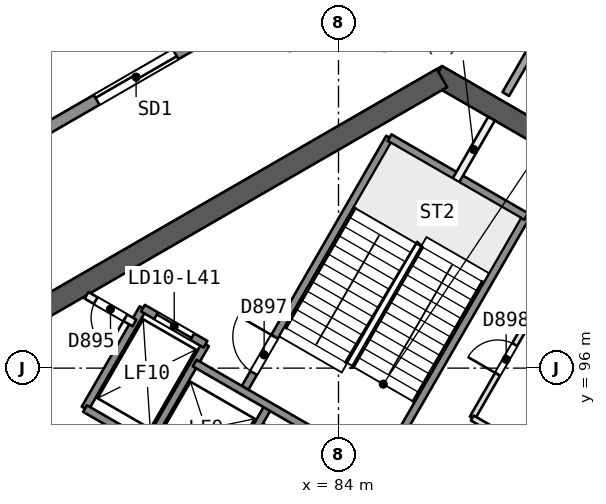
"""IFC4 building model, lengths in metres.
Left out: names, types, materials, properties, quantities, classifications, styles, units other than length and angle.
Written with IfcOpenShell. Run it as: python <this file> out.ifc"""

import sys

from ifc_helpers import new_model, si_unit, direction, frame, frame_2d, origin, place, context, subcontext, project, spatial, rectangle, extrude, element, fill, save


model = new_model("IFC4")
c1 = context("Model", 3, precision=1e-05, world=origin(), true_north=direction((0.0, 1.0)))
c2 = subcontext(c1, "Body", "Model", "MODEL_VIEW")
j1 = project(units=[si_unit("LENGTHUNIT", "METRE"), si_unit("PLANEANGLEUNIT", "RADIAN")], contexts=[c1])
p1 = place(None, origin())
s1 = spatial("IfcSite", under=j1, at=p1, CompositionType="ELEMENT")
p2 = place(p1, origin())
s2 = spatial("IfcBuilding", under=s1, at=p2, CompositionType="ELEMENT")
p3 = place(p2, frame((0.0, 0.0, 171.1)))
s3 = spatial("IfcBuildingStorey", under=s2, at=p3, CompositionType="ELEMENT", Elevation=171.1)
p4 = place(p3, frame((89.605, 101.969, 0.0), z_axis=(0.0, 0.0, 1.0), x_axis=(-0.865997833373, 0.500047750313, 0.0)))
e1 = element("IfcWall", 1, at=p4, inside=s3, PredefinedType="SHEAR", context=c2, shape_type="SweptSolid", body=[
    extrude(rectangle(XDim=3.487, YDim=0.55, at=frame_2d((1.743, 0.0))), origin(), (0.0, 0.0, 1.0), 3.7),
])
p5 = place(p3, frame((86.723, 103.633, 0.0), z_axis=(0.0, 0.0, 1.0), x_axis=(-0.866023530946, -0.500003243837, 0.0)))
e2 = element("IfcWall", 2, at=p5, inside=s3, PredefinedType="SHEAR", context=c2, shape_type="SweptSolid", body=[
    extrude(rectangle(XDim=14.175, YDim=0.55, at=frame_2d((7.087, 0.0))), origin(), (0.0, 0.0, 1.0), 3.7),
])
p6 = place(p3, frame((74.686, 96.683, 0.0), z_axis=(0.0, 0.0, 1.0), x_axis=(0.499997818338, -0.866026663364, 0.0)))
e3 = element("IfcWall", 3, at=p6, inside=s3, PredefinedType="SHEAR", context=c2, shape_type="SweptSolid", body=[
    extrude(rectangle(XDim=10.105, YDim=0.55, at=frame_2d((5.052, 0.0))), origin(), (0.0, 0.0, 1.0), 3.7),
])
p7 = place(p6, frame((7.955, 0.0, 0.0)))
e4 = element("IfcOpeningElement", 4, at=p7, cuts=e3, PredefinedType="OPENING", context=c2, shape_type="SweptSolid", body=[
    extrude(rectangle(XDim=1.2, YDim=2.1, at=frame_2d((0.6, 1.05))), frame((0.0, 0.286, 0.0), z_axis=(0.0, -1.0, 0.0), x_axis=(1.0, 0.0, 0.0)), (0.0, 0.0, 1.0), 0.571),
])
p8 = place(p3, frame((91.202, 108.06, 0.0), z_axis=(0.0, 0.0, 1.0), x_axis=(-0.500021875362, -0.86601277367, 0.0)))
e5 = element("IfcWall", 5, at=p8, inside=s3, PredefinedType="PARTITIONING", context=c2, shape_type="SweptSolid", body=[
    extrude(rectangle(XDim=5.599, YDim=0.2, at=frame_2d((2.8, 0.0))), origin(), (0.0, 0.0, 1.0), 3.25),
])
p9 = place(p3, frame((42.45, 82.744, 0.0), z_axis=(0.0, 0.0, 1.0), x_axis=(0.866024128163, 0.500002209434, 0.0)))
e6 = element("IfcWall", 6, at=p9, inside=s3, PredefinedType="SOLIDWALL", context=c2, shape_type="SweptSolid", body=[
    extrude(rectangle(XDim=53.635, YDim=0.3, at=frame_2d((26.817, 0.0))), origin(), (0.0, 0.0, 1.0), 3.25),
])
p10 = place(p9, frame((20.473, 0.0, 0.0)))
e7 = element("IfcOpeningElement", 7, at=p10, cuts=e6, PredefinedType="OPENING", context=c2, shape_type="SweptSolid", body=[
    extrude(rectangle(XDim=2.4, YDim=2.4, at=frame_2d((1.2, 1.2))), frame((0.0, 0.161, 0.0), z_axis=(0.0, -1.0, 0.0), x_axis=(1.0, 0.0, 0.0)), (0.0, 0.0, 1.0), 0.321),
])
p11 = place(p9, frame((9.514, 0.0, 0.0)))
e8 = element("IfcOpeningElement", 8, at=p11, cuts=e6, PredefinedType="OPENING", context=c2, shape_type="SweptSolid", body=[
    extrude(rectangle(XDim=2.4, YDim=2.4, at=frame_2d((1.2, 1.2))), frame((0.0, 0.161, 0.0), z_axis=(0.0, -1.0, 0.0), x_axis=(1.0, 0.0, 0.0)), (0.0, 0.0, 1.0), 0.321),
])
p12 = place(p9, frame((40.628, 0.0, 0.0)))
e9 = element("IfcOpeningElement", 9, at=p12, cuts=e6, PredefinedType="OPENING", context=c2, shape_type="SweptSolid", body=[
    extrude(rectangle(XDim=2.4, YDim=2.4, at=frame_2d((1.2, 1.2))), frame((0.0, 0.161, 0.0), z_axis=(0.0, -1.0, 0.0), x_axis=(1.0, 0.0, 0.0)), (0.0, 0.0, 1.0), 0.321),
])
p13 = place(p9, frame((27.632, 0.0, 0.9)))
e10 = element("IfcOpeningElement", 10, at=p13, cuts=e6, PredefinedType="OPENING", context=c2, shape_type="SweptSolid", body=[
    extrude(rectangle(XDim=1.8, YDim=1.5, at=frame_2d((0.9, 0.75))), frame((0.0, 0.161, 0.0), z_axis=(0.0, -1.0, 0.0), x_axis=(1.0, 0.0, 0.0)), (0.0, 0.0, 1.0), 0.321),
])
p14 = place(p9, frame((24.826, 0.0, 0.9)))
e11 = element("IfcOpeningElement", 11, at=p14, cuts=e6, PredefinedType="OPENING", context=c2, shape_type="SweptSolid", body=[
    extrude(rectangle(XDim=1.8, YDim=1.5, at=frame_2d((0.9, 0.75))), frame((0.0, 0.161, 0.0), z_axis=(0.0, -1.0, 0.0), x_axis=(1.0, 0.0, 0.0)), (0.0, 0.0, 1.0), 0.321),
])
p15 = place(p3, frame((87.521, 94.687, 0.0), z_axis=(0.0, 0.0, 1.0), x_axis=(0.500043727655, 0.866000156139, 0.0)))
e12 = element("IfcWall", 12, at=p15, inside=s3, PredefinedType="PARTITIONING", context=c2, shape_type="SweptSolid", body=[
    extrude(rectangle(XDim=3.618, YDim=0.15, at=frame_2d((1.809, 0.0))), origin(), (0.0, 0.0, 1.0), 3.25),
])
p16 = place(p15, frame((1.332, 0.0, 0.0)))
e13 = element("IfcOpeningElement", 13, at=p16, cuts=e12, PredefinedType="OPENING", context=c2, shape_type="SweptSolid", body=[
    extrude(rectangle(XDim=0.9, YDim=2.1, at=frame_2d((0.45, 1.05))), frame((0.0, 0.085, 0.0), z_axis=(0.0, -1.0, 0.0), x_axis=(1.0, 0.0, 0.0)), (0.0, 0.0, 1.0), 0.171),
])
p17 = place(p3, frame((85.087, 93.321, 0.0), z_axis=(0.0, 0.0, 1.0), x_axis=(0.500019787375, 0.866013979237, 0.0)))
e14 = element("IfcWall", 14, at=p17, inside=s3, PredefinedType="SOLIDWALL", context=c2, shape_type="SweptSolid", body=[
    extrude(rectangle(XDim=7.7, YDim=0.2, at=frame_2d((3.85, 0.0))), origin(), (0.0, 0.0, 1.0), 3.25),
])
p18 = place(p3, frame((87.09, 100.94, 0.0), z_axis=(0.0, 0.0, 1.0), x_axis=(0.499951854219, 0.86605319898, 0.0)))
e15 = element("IfcWall", 15, at=p18, inside=s3, PredefinedType="PARTITIONING", context=c2, shape_type="SweptSolid", body=[
    extrude(rectangle(XDim=1.873, YDim=0.2, at=frame_2d((0.937, 0.0))), origin(), (0.0, 0.0, 1.0), 3.25),
])
p19 = place(p3, frame((80.924, 92.861, 0.0), z_axis=(0.0, 0.0, 1.0), x_axis=(0.499961042966, 0.86604789447, 0.0)))
e16 = element("IfcWall", 16, at=p19, inside=s3, PredefinedType="SOLIDWALL", context=c2, shape_type="SweptSolid", body=[
    extrude(rectangle(XDim=2.48, YDim=0.2, at=frame_2d((1.24, 0.0))), origin(), (0.0, 0.0, 1.0), 3.25),
])
p20 = place(p3, frame((81.493, 95.396, 0.0), z_axis=(0.0, 0.0, 1.0), x_axis=(0.500006057782, 0.866021906294, 0.0)))
e17 = element("IfcWall", 17, at=p20, inside=s3, PredefinedType="SOLIDWALL", context=c2, shape_type="SweptSolid", body=[
    extrude(rectangle(XDim=7.7, YDim=0.2, at=frame_2d((3.85, 0.0))), origin(), (0.0, 0.0, 1.0), 3.25),
])
p21 = place(p20, frame((0.55, 0.0, 0.0)))
e18 = element("IfcOpeningElement", 18, at=p21, cuts=e17, PredefinedType="OPENING", context=c2, shape_type="SweptSolid", body=[
    extrude(rectangle(XDim=1.1, YDim=2.1, at=frame_2d((0.55, 1.05))), frame((0.0, 0.11, 0.0), z_axis=(0.0, -1.0, 0.0), x_axis=(1.0, 0.0, 0.0)), (0.0, 0.0, 1.0), 0.221),
])
for number, where, z_axis, x_axis in (
    (19, (78.976, 93.986, 0.0), (0.0, 0.0, 1.0), (0.5, 0.866, 0.0)),
    (20, (77.33, 94.936, 0.0), (0.0, 0.0, 1.0), (0.5, 0.866, 0.0)),
):
    element("IfcWall", number, at=place(p3, frame(where, z_axis=z_axis, x_axis=x_axis)), inside=s3, PredefinedType="SOLIDWALL", context=c2, shape_type="SweptSolid", body=[
        extrude(rectangle(XDim=3.05, YDim=0.2, at=frame_2d((1.525, 0.0))), origin(), (0.0, 0.0, 1.0), 3.25),
    ])
p22 = place(p3, frame((86.77, 89.486, 0.0), z_axis=(0.0, 0.0, 1.0), x_axis=(-0.86601811187, 0.500012629753, 0.0)))
e21 = element("IfcWall", 21, at=p22, inside=s3, PredefinedType="SOLIDWALL", context=c2, shape_type="SweptSolid", body=[
    extrude(rectangle(XDim=10.9, YDim=0.2, at=frame_2d((5.45, 0.0))), origin(), (0.0, 0.0, 1.0), 3.25),
])
p23 = place(p22, frame((0.575, 0.0, 0.0)))
e22 = element("IfcOpeningElement", 22, at=p23, cuts=e21, PredefinedType="OPENING", context=c2, shape_type="SweptSolid", body=[
    extrude(rectangle(XDim=1.1, YDim=2.1, at=frame_2d((0.55, 1.05))), frame((0.0, 0.11, 0.0), z_axis=(0.0, -1.0, 0.0), x_axis=(1.0, 0.0, 0.0)), (0.0, 0.0, 1.0), 0.221),
])
p24 = place(p22, frame((2.825, 0.0, 0.0)))
e23 = element("IfcOpeningElement", 23, at=p24, cuts=e21, PredefinedType="OPENING", context=c2, shape_type="SweptSolid", body=[
    extrude(rectangle(XDim=1.1, YDim=2.1, at=frame_2d((0.55, 1.05))), frame((0.0, 0.11, 0.0), z_axis=(0.0, -1.0, 0.0), x_axis=(1.0, 0.0, 0.0)), (0.0, 0.0, 1.0), 0.221),
])
p25 = place(p22, frame((5.075, 0.0, 0.0)))
e24 = element("IfcOpeningElement", 24, at=p25, cuts=e21, PredefinedType="OPENING", context=c2, shape_type="SweptSolid", body=[
    extrude(rectangle(XDim=1.1, YDim=2.1, at=frame_2d((0.55, 1.05))), frame((0.0, 0.11, 0.0), z_axis=(0.0, -1.0, 0.0), x_axis=(1.0, 0.0, 0.0)), (0.0, 0.0, 1.0), 0.221),
])
p26 = place(p22, frame((7.325, 0.0, 0.0)))
e25 = element("IfcOpeningElement", 25, at=p26, cuts=e21, PredefinedType="OPENING", context=c2, shape_type="SweptSolid", body=[
    extrude(rectangle(XDim=1.1, YDim=2.1, at=frame_2d((0.55, 1.05))), frame((0.0, 0.11, 0.0), z_axis=(0.0, -1.0, 0.0), x_axis=(1.0, 0.0, 0.0)), (0.0, 0.0, 1.0), 0.221),
])
p27 = place(p3, frame((89.33, 90.872, 0.0), z_axis=(0.0, 0.0, 1.0), x_axis=(-0.866027589512, 0.49999621419, 0.0)))
e26 = element("IfcWall", 26, at=p27, inside=s3, PredefinedType="SOLIDWALL", context=c2, shape_type="SweptSolid", body=[
    extrude(rectangle(XDim=10.524, YDim=0.2, at=frame_2d((5.262, 0.0))), origin(), (0.0, 0.0, 1.0), 3.25),
])
p28 = place(p27, frame((0.312, 0.0, 0.0)))
e27 = element("IfcOpeningElement", 27, at=p28, cuts=e26, PredefinedType="OPENING", context=c2, shape_type="SweptSolid", body=[
    extrude(rectangle(XDim=0.9, YDim=2.1, at=frame_2d((0.45, 1.05))), frame((0.0, 0.11, 0.0), z_axis=(0.0, -1.0, 0.0), x_axis=(1.0, 0.0, 0.0)), (0.0, 0.0, 1.0), 0.221),
])
p29 = place(p3, frame((78.63, 97.188, 0.0), z_axis=(0.0, 0.0, 1.0), x_axis=(-0.866003949776, 0.500037157592, 0.0)))
e28 = element("IfcWall", 28, at=p29, inside=s3, PredefinedType="PARTITIONING", context=c2, shape_type="SweptSolid", body=[
    extrude(rectangle(XDim=1.455, YDim=0.2, at=frame_2d((0.728, 0.0))), origin(), (0.0, 0.0, 1.0), 3.25),
])
p30 = place(p29, frame((0.278, 0.0, 0.0)))
e29 = element("IfcOpeningElement", 29, at=p30, cuts=e28, PredefinedType="OPENING", context=c2, shape_type="SweptSolid", body=[
    extrude(rectangle(XDim=0.9, YDim=2.1, at=frame_2d((0.45, 1.05))), frame((0.0, 0.11, 0.0), z_axis=(0.0, -1.0, 0.0), x_axis=(1.0, 0.0, 0.0)), (0.0, 0.0, 1.0), 0.221),
])
p31 = place(p3, frame((80.5, 96.627, 0.0), z_axis=(0.0, 0.0, 1.0), x_axis=(-0.86601224135, 0.500022797313, 0.0)))
e30 = element("IfcWall", 30, at=p31, inside=s3, PredefinedType="SOLIDWALL", context=c2, shape_type="SweptSolid", body=[
    extrude(rectangle(XDim=1.9, YDim=0.2, at=frame_2d((0.95, 0.0))), origin(), (0.0, 0.0, 1.0), 3.25),
])
p32 = place(p31, frame((0.4, 0.0, 0.0)))
e31 = element("IfcOpeningElement", 31, at=p32, cuts=e30, PredefinedType="OPENING", context=c2, shape_type="SweptSolid", body=[
    extrude(rectangle(XDim=1.1, YDim=2.1, at=frame_2d((0.55, 1.05))), frame((0.0, 0.11, 0.0), z_axis=(0.0, -1.0, 0.0), x_axis=(1.0, 0.0, 0.0)), (0.0, 0.0, 1.0), 0.221),
])
p33 = place(p3, frame((89.33, 93.643, 0.0), z_axis=(0.0, 0.0, 1.0), x_axis=(-0.866033778982, 0.499985493453, 0.0)))
e32 = element("IfcWall", 32, at=p33, inside=s3, PredefinedType="PARTITIONING", context=c2, shape_type="SweptSolid", body=[
    extrude(rectangle(XDim=2.089, YDim=0.15, at=frame_2d((1.044, 0.0))), origin(), (0.0, 0.0, 1.0), 3.25),
])
p34 = place(p3, frame((88.937, 99.99, 0.0), z_axis=(0.0, 0.0, 1.0), x_axis=(-0.866004344652, 0.500036473714, 0.0)))
e33 = element("IfcWall", 33, at=p34, inside=s3, PredefinedType="SOLIDWALL", context=c2, shape_type="SweptSolid", body=[
    extrude(rectangle(XDim=4.15, YDim=0.2, at=frame_2d((2.075, 0.0))), origin(), (0.0, 0.0, 1.0), 3.25),
])
p35 = place(p12, origin())
e34 = element("IfcDoor", 34, at=p35, inside=s3, OperationType="SLIDING_TO_LEFT", PredefinedType="NOTDEFINED", context=c2, shape_type="SweptSolid", body=[
    extrude(rectangle(XDim=2.4, YDim=2.4, at=frame_2d((1.2, 1.2))), frame((0.0, 0.025, 0.0), z_axis=(0.0, -1.0, 0.0), x_axis=(1.0, 0.0, 0.0)), (0.0, 0.0, 1.0), 0.05),
])
fill(e9, e34)
p36 = place(p32, origin())
e35 = element("IfcDoor", 35, at=p36, inside=s3, OperationType="SLIDING_TO_RIGHT", PredefinedType="NOTDEFINED", context=c2, shape_type="SweptSolid", body=[
    extrude(rectangle(XDim=1.1, YDim=2.1, at=frame_2d((0.55, 1.05))), frame((0.0, 0.025, 0.0), z_axis=(0.0, -1.0, 0.0), x_axis=(1.0, 0.0, 0.0)), (0.0, 0.0, 1.0), 0.05),
])
fill(e31, e35)
p37 = place(p30, origin())
e36 = element("IfcDoor", 36, at=p37, inside=s3, OperationType="SINGLE_SWING_LEFT", PredefinedType="NOTDEFINED", context=c2, shape_type="SweptSolid", body=[
    extrude(rectangle(XDim=0.9, YDim=2.1, at=frame_2d((0.45, 1.05))), frame((0.0, 0.025, 0.0), z_axis=(0.0, -1.0, 0.0), x_axis=(1.0, 0.0, 0.0)), (0.0, 0.0, 1.0), 0.05),
])
fill(e29, e36)
p38 = place(p21, origin())
e37 = element("IfcDoor", 37, at=p38, inside=s3, OperationType="SINGLE_SWING_RIGHT", PredefinedType="NOTDEFINED", context=c2, shape_type="SweptSolid", body=[
    extrude(rectangle(XDim=1.1, YDim=2.1, at=frame_2d((0.55, 1.05))), frame((0.0, 0.025, 0.0), z_axis=(0.0, -1.0, 0.0), x_axis=(1.0, 0.0, 0.0)), (0.0, 0.0, 1.0), 0.05),
])
fill(e18, e37)
p39 = place(p16, origin())
e38 = element("IfcDoor", 38, at=p39, inside=s3, OperationType="SINGLE_SWING_LEFT", PredefinedType="NOTDEFINED", context=c2, shape_type="SweptSolid", body=[
    extrude(rectangle(XDim=0.9, YDim=2.1, at=frame_2d((0.45, 1.05))), frame((0.0, 0.025, 0.0), z_axis=(0.0, -1.0, 0.0), x_axis=(1.0, 0.0, 0.0)), (0.0, 0.0, 1.0), 0.05),
])
fill(e13, e38)
save(model, sys.argv[1])
